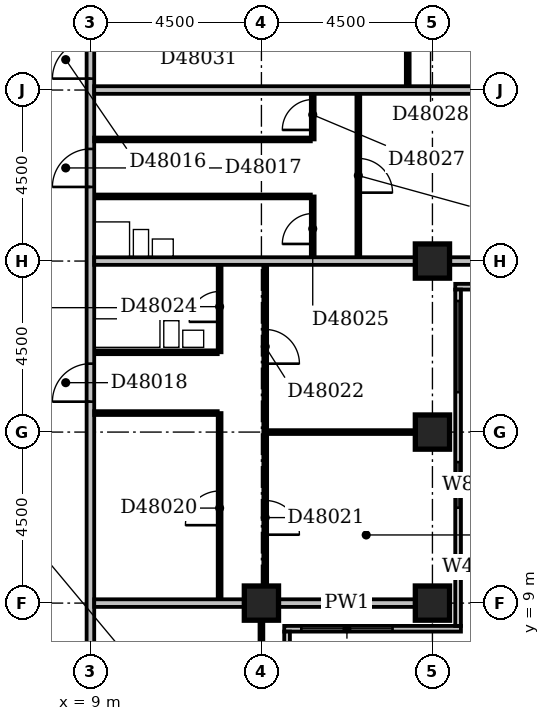
"""IFC4 building model, lengths in metres.
Left out: names, types, materials, properties, quantities, classifications, styles, units other than length and angle.
Written with IfcOpenShell. Run it as: python <this file> out.ifc"""

import sys

from ifc_helpers import new_model, si_unit, direction, frame, frame_2d, origin, origin_2d, place, context, subcontext, project, spatial, rectangle, extrude, element, fill, save


model = new_model("IFC4")
c1 = context("Model", 3, precision=1e-05, world=origin(), true_north=direction((0.0, 1.0)))
c2 = subcontext(c1, "Body", "Model", "MODEL_VIEW")
j1 = project(units=[si_unit("LENGTHUNIT", "METRE"), si_unit("PLANEANGLEUNIT", "RADIAN")], contexts=[c1])
p1 = place(None, origin())
s1 = spatial("IfcSite", under=j1, at=p1, CompositionType="ELEMENT")
p2 = place(p1, origin())
s2 = spatial("IfcBuilding", under=s1, at=p2, CompositionType="ELEMENT")
p3 = place(p2, frame((0.0, 0.0, 189.8)))
s3 = spatial("IfcBuildingStorey", under=s2, at=p3, CompositionType="ELEMENT", Elevation=189.8)
for number, where, z_axis, x_axis in (
    (1, (13.5, 9.0, -0.3), (0.0, 0.0, 1.0), (1.0, 0.0, 0.0)),
    (2, (18.0, 9.0, -0.3), (0.0, 0.0, 1.0), (1.0, 0.0, 0.0)),
    (3, (18.0, 13.5, -0.3), (0.0, 0.0, 1.0), (1.0, 0.0, 0.0)),
    (4, (18.0, 18.0, -0.3), (0.0, 0.0, 1.0), (1.0, 0.0, 0.0)),
):
    element("IfcColumn", number, at=place(p3, frame(where, z_axis=z_axis, x_axis=x_axis)), inside=s3, PredefinedType="COLUMN", context=c2, shape_type="SweptSolid", body=[
        extrude(rectangle(XDim=0.9, YDim=0.9, at=origin_2d()), origin(), (0.0, 0.0, 1.0), 3.6),
    ])
p4 = place(p3, frame((14.175, 3.9, 0.0), z_axis=(0.0, 0.0, 1.0), x_axis=(0.0, 1.0, 0.0)))
e5 = element("IfcWall", 5, at=p4, inside=s3, PredefinedType="STANDARD", context=c2, shape_type="SweptSolid", body=[
    extrude(rectangle(XDim=4.35, YDim=0.15, at=frame_2d((2.175, 0.0))), origin(), (0.0, 0.0, 1.0), 2.7),
])
p5 = place(p4, frame((1.65, 0.0, 0.6)))
e6 = element("IfcOpeningElement", 6, at=p5, cuts=e5, PredefinedType="OPENING", context=c2, shape_type="SweptSolid", body=[
    extrude(rectangle(XDim=2.4, YDim=1.8, at=frame_2d((1.2, 0.9))), frame((0.0, 0.087, 0.0), z_axis=(0.0, -1.0, 0.0), x_axis=(1.0, 0.0, 0.0)), (0.0, 0.0, 1.0), 0.174),
])
p6 = place(p3, frame((14.1, 8.325, 0.0), z_axis=(0.0, 0.0, 1.0), x_axis=(1.0, 0.0, 0.0)))
e7 = element("IfcWall", 7, at=p6, inside=s3, PredefinedType="STANDARD", context=c2, shape_type="SweptSolid", body=[
    extrude(rectangle(XDim=4.65, YDim=0.15, at=frame_2d((2.325, 0.0))), origin(), (0.0, 0.0, 1.0), 2.7),
])
p7 = place(p6, frame((0.45, 0.0, 0.6)))
e8 = element("IfcOpeningElement", 8, at=p7, cuts=e7, PredefinedType="OPENING", context=c2, shape_type="SweptSolid", body=[
    extrude(rectangle(XDim=2.4, YDim=1.8, at=frame_2d((1.2, 0.9))), frame((0.0, 0.087, 0.0), z_axis=(0.0, -1.0, 0.0), x_axis=(1.0, 0.0, 0.0)), (0.0, 0.0, 1.0), 0.174),
])
p8 = place(p3, frame((18.675, 8.4, 0.0), z_axis=(0.0, 0.0, 1.0), x_axis=(0.0, 1.0, 0.0)))
e9 = element("IfcWall", 9, at=p8, inside=s3, PredefinedType="STANDARD", context=c2, shape_type="SweptSolid", body=[
    extrude(rectangle(XDim=8.85, YDim=0.15, at=frame_2d((4.425, 0.0))), origin(), (0.0, 0.0, 1.0), 2.7),
])
p9 = place(p8, frame((1.259, 0.0, 0.6)))
e10 = element("IfcOpeningElement", 10, at=p9, cuts=e9, PredefinedType="OPENING", context=c2, shape_type="SweptSolid", body=[
    extrude(rectangle(XDim=0.6, YDim=1.8, at=frame_2d((0.3, 0.9))), frame((0.0, 0.087, 0.0), z_axis=(0.0, -1.0, 0.0), x_axis=(1.0, 0.0, 0.0)), (0.0, 0.0, 1.0), 0.174),
])
p10 = place(p8, frame((3.11, 0.0, 0.6)))
e11 = element("IfcOpeningElement", 11, at=p10, cuts=e9, PredefinedType="OPENING", context=c2, shape_type="SweptSolid", body=[
    extrude(rectangle(XDim=1.2, YDim=1.8, at=frame_2d((0.6, 0.9))), frame((0.0, 0.087, 0.0), z_axis=(0.0, -1.0, 0.0), x_axis=(1.0, 0.0, 0.0)), (0.0, 0.0, 1.0), 0.174),
])
p11 = place(p8, frame((6.15, 0.0, 0.6)))
e12 = element("IfcOpeningElement", 12, at=p11, cuts=e9, PredefinedType="OPENING", context=c2, shape_type="SweptSolid", body=[
    extrude(rectangle(XDim=2.4, YDim=1.8, at=frame_2d((1.2, 0.9))), frame((0.0, 0.087, 0.0), z_axis=(0.0, -1.0, 0.0), x_axis=(1.0, 0.0, 0.0)), (0.0, 0.0, 1.0), 0.174),
])
p12 = place(p3, frame((18.6, 17.325, 0.0), z_axis=(0.0, 0.0, 1.0), x_axis=(1.0, 0.0, 0.0)))
e13 = element("IfcWall", 13, at=p12, inside=s3, PredefinedType="STANDARD", context=c2, shape_type="SweptSolid", body=[
    extrude(rectangle(XDim=4.65, YDim=0.15, at=frame_2d((2.325, 0.0))), origin(), (0.0, 0.0, 1.0), 2.7),
])
p13 = place(p12, frame((0.45, 0.0, 0.6)))
e14 = element("IfcOpeningElement", 14, at=p13, cuts=e13, PredefinedType="OPENING", context=c2, shape_type="SweptSolid", body=[
    extrude(rectangle(XDim=2.4, YDim=1.8, at=frame_2d((1.2, 0.9))), frame((0.0, 0.087, 0.0), z_axis=(0.0, -1.0, 0.0), x_axis=(1.0, 0.0, 0.0)), (0.0, 0.0, 1.0), 0.174),
])
p14 = place(p3, frame((13.5, 4.95, 0.0), z_axis=(0.0, 0.0, 1.0), x_axis=(0.0, 1.0, 0.0)))
e15 = element("IfcWall", 15, at=p14, inside=s3, PredefinedType="PARTITIONING", context=c2, shape_type="SweptSolid", body=[
    extrude(rectangle(XDim=3.6, YDim=0.1, at=frame_2d((1.8, 0.0))), origin(), (0.0, 0.0, 1.0), 2.7),
])
p15 = place(p3, frame((9.0, 5.0, 0.0), z_axis=(0.0, 0.0, 1.0), x_axis=(0.0, 1.0, 0.0)))
e16 = element("IfcWall", 16, at=p15, inside=s3, PredefinedType="PARTITIONING", context=c2, shape_type="SweptSolid", body=[
    extrude(rectangle(XDim=31.0, YDim=0.2, at=frame_2d((15.5, 0.0))), origin(), (0.0, 0.0, 1.0), 3.3),
])
p16 = place(p15, frame((17.8, 0.0, 0.0)))
e17 = element("IfcOpeningElement", 17, at=p16, cuts=e16, PredefinedType="OPENING", context=c2, shape_type="SweptSolid", body=[
    extrude(rectangle(XDim=1.0, YDim=2.1, at=frame_2d((0.5, 1.05))), frame((0.0, 0.112, 0.0), z_axis=(0.0, -1.0, 0.0), x_axis=(1.0, 0.0, 0.0)), (0.0, 0.0, 1.0), 0.224),
])
p17 = place(p15, frame((14.95, 0.0, 0.0)))
e18 = element("IfcOpeningElement", 18, at=p17, cuts=e16, PredefinedType="OPENING", context=c2, shape_type="SweptSolid", body=[
    extrude(rectangle(XDim=1.0, YDim=2.1, at=frame_2d((0.5, 1.05))), frame((0.0, 0.112, 0.0), z_axis=(0.0, -1.0, 0.0), x_axis=(1.0, 0.0, 0.0)), (0.0, 0.0, 1.0), 0.224),
])
p18 = place(p15, frame((9.3, 0.0, 0.0)))
e19 = element("IfcOpeningElement", 19, at=p18, cuts=e16, PredefinedType="OPENING", context=c2, shape_type="SweptSolid", body=[
    extrude(rectangle(XDim=1.0, YDim=2.1, at=frame_2d((0.5, 1.05))), frame((0.0, 0.112, 0.0), z_axis=(0.0, -1.0, 0.0), x_axis=(1.0, 0.0, 0.0)), (0.0, 0.0, 1.0), 0.224),
])
p19 = place(p15, frame((1.5, 0.0, 0.0)))
e20 = element("IfcOpeningElement", 20, at=p19, cuts=e16, PredefinedType="OPENING", context=c2, shape_type="SweptSolid", body=[
    extrude(rectangle(XDim=0.9, YDim=2.1, at=frame_2d((0.45, 1.05))), frame((0.0, 0.112, 0.0), z_axis=(0.0, -1.0, 0.0), x_axis=(1.0, 0.0, 0.0)), (0.0, 0.0, 1.0), 0.224),
])
p20 = place(p3, frame((9.1, 9.0, 0.0), z_axis=(0.0, 0.0, 1.0), x_axis=(1.0, 0.0, 0.0)))
e21 = element("IfcWall", 21, at=p20, inside=s3, PredefinedType="PARTITIONING", context=c2, shape_type="SweptSolid", body=[
    extrude(rectangle(XDim=3.95, YDim=0.2, at=frame_2d((1.975, 0.0))), origin(), (0.0, 0.0, 1.0), 3.3),
])
p21 = place(p3, frame((13.95, 9.0, 0.0), z_axis=(0.0, 0.0, 1.0), x_axis=(1.0, 0.0, 0.0)))
e22 = element("IfcWall", 22, at=p21, inside=s3, PredefinedType="PARTITIONING", context=c2, shape_type="SweptSolid", body=[
    extrude(rectangle(XDim=3.6, YDim=0.2, at=frame_2d((1.8, 0.0))), origin(), (0.0, 0.0, 1.0), 2.7),
])
p22 = place(p3, frame((12.4, 9.1, 0.0), z_axis=(0.0, 0.0, 1.0), x_axis=(0.0, 1.0, 0.0)))
e23 = element("IfcWall", 23, at=p22, inside=s3, PredefinedType="PARTITIONING", context=c2, shape_type="SweptSolid", body=[
    extrude(rectangle(XDim=4.9, YDim=0.1, at=frame_2d((2.45, 0.0))), origin(), (0.0, 0.0, 1.0), 3.3),
])
p23 = place(p22, frame((1.95, 0.0, 0.0)))
e24 = element("IfcOpeningElement", 24, at=p23, cuts=e23, PredefinedType="OPENING", context=c2, shape_type="SweptSolid", body=[
    extrude(rectangle(XDim=0.9, YDim=2.1, at=frame_2d((0.45, 1.05))), frame((0.0, 0.062, 0.0), z_axis=(0.0, -1.0, 0.0), x_axis=(1.0, 0.0, 0.0)), (0.0, 0.0, 1.0), 0.124),
])
p24 = place(p3, frame((13.6, 9.45, 0.0), z_axis=(0.0, 0.0, 1.0), x_axis=(0.0, 1.0, 0.0)))
e25 = element("IfcWall", 25, at=p24, inside=s3, PredefinedType="PARTITIONING", context=c2, shape_type="SweptSolid", body=[
    extrude(rectangle(XDim=8.45, YDim=0.1, at=frame_2d((4.225, 0.0))), origin(), (0.0, 0.0, 1.0), 3.3),
])
p25 = place(p24, frame((1.35, 0.0, 0.0)))
e26 = element("IfcOpeningElement", 26, at=p25, cuts=e25, PredefinedType="OPENING", context=c2, shape_type="SweptSolid", body=[
    extrude(rectangle(XDim=0.9, YDim=2.1, at=frame_2d((0.45, 1.05))), frame((0.0, 0.062, 0.0), z_axis=(0.0, -1.0, 0.0), x_axis=(1.0, 0.0, 0.0)), (0.0, 0.0, 1.0), 0.124),
])
p26 = place(p24, frame((5.85, 0.0, 0.0)))
e27 = element("IfcOpeningElement", 27, at=p26, cuts=e25, PredefinedType="OPENING", context=c2, shape_type="SweptSolid", body=[
    extrude(rectangle(XDim=0.9, YDim=2.1, at=frame_2d((0.45, 1.05))), frame((0.0, 0.062, 0.0), z_axis=(0.0, -1.0, 0.0), x_axis=(1.0, 0.0, 0.0)), (0.0, 0.0, 1.0), 0.124),
])
p27 = place(p3, frame((13.65, 13.5, 0.0), z_axis=(0.0, 0.0, 1.0), x_axis=(1.0, 0.0, 0.0)))
e28 = element("IfcWall", 28, at=p27, inside=s3, PredefinedType="PARTITIONING", context=c2, shape_type="SweptSolid", body=[
    extrude(rectangle(XDim=3.9, YDim=0.1, at=frame_2d((1.95, 0.0))), origin(), (0.0, 0.0, 1.0), 3.3),
])
p28 = place(p3, frame((9.1, 14.0, 0.0), z_axis=(0.0, 0.0, 1.0), x_axis=(1.0, 0.0, 0.0)))
e29 = element("IfcWall", 29, at=p28, inside=s3, PredefinedType="PARTITIONING", context=c2, shape_type="SweptSolid", body=[
    extrude(rectangle(XDim=3.25, YDim=0.1, at=frame_2d((1.625, 0.0))), origin(), (0.0, 0.0, 1.0), 3.3),
])
p29 = place(p3, frame((9.1, 15.6, 0.0), z_axis=(0.0, 0.0, 1.0), x_axis=(1.0, 0.0, 0.0)))
e30 = element("IfcWall", 30, at=p29, inside=s3, PredefinedType="PLUMBINGWALL", context=c2, shape_type="SweptSolid", body=[
    extrude(rectangle(XDim=3.25, YDim=0.1, at=frame_2d((1.625, 0.0))), origin(), (0.0, 0.0, 1.0), 3.3),
])
p30 = place(p3, frame((12.4, 15.6, 0.0), z_axis=(0.0, 0.0, 1.0), x_axis=(0.0, 1.0, 0.0)))
e31 = element("IfcWall", 31, at=p30, inside=s3, PredefinedType="PARTITIONING", context=c2, shape_type="SweptSolid", body=[
    extrude(rectangle(XDim=2.3, YDim=0.1, at=frame_2d((1.15, 0.0))), origin(), (0.0, 0.0, 1.0), 3.3),
])
p31 = place(p30, frame((0.8, 0.0, 0.0)))
e32 = element("IfcOpeningElement", 32, at=p31, cuts=e31, PredefinedType="OPENING", context=c2, shape_type="SweptSolid", body=[
    extrude(rectangle(XDim=0.8, YDim=2.1, at=frame_2d((0.4, 1.05))), frame((0.0, 0.062, 0.0), z_axis=(0.0, -1.0, 0.0), x_axis=(1.0, 0.0, 0.0)), (0.0, 0.0, 1.0), 0.124),
])
p32 = place(p3, frame((9.1, 18.0, 0.0), z_axis=(0.0, 0.0, 1.0), x_axis=(1.0, 0.0, 0.0)))
e33 = element("IfcWall", 33, at=p32, inside=s3, PredefinedType="PARTITIONING", context=c2, shape_type="SweptSolid", body=[
    extrude(rectangle(XDim=8.45, YDim=0.2, at=frame_2d((4.225, 0.0))), origin(), (0.0, 0.0, 1.0), 2.6),
])
p33 = place(p3, frame((18.45, 18.0, 0.0), z_axis=(0.0, 0.0, 1.0), x_axis=(1.0, 0.0, 0.0)))
e34 = element("IfcWall", 34, at=p33, inside=s3, PredefinedType="PARTITIONING", context=c2, shape_type="SweptSolid", body=[
    extrude(rectangle(XDim=3.6, YDim=0.2, at=frame_2d((1.8, 0.0))), origin(), (0.0, 0.0, 1.0), 2.7),
])
p34 = place(p3, frame((14.85, 18.1, 0.0), z_axis=(0.0, 0.0, 1.0), x_axis=(0.0, 1.0, 0.0)))
e35 = element("IfcWall", 35, at=p34, inside=s3, PredefinedType="PARTITIONING", context=c2, shape_type="SweptSolid", body=[
    extrude(rectangle(XDim=1.6, YDim=0.1, at=frame_2d((0.8, 0.0))), origin(), (0.0, 0.0, 1.0), 3.3),
])
p35 = place(p34, frame((0.35, 0.0, 0.0)))
e36 = element("IfcOpeningElement", 36, at=p35, cuts=e35, PredefinedType="OPENING", context=c2, shape_type="SweptSolid", body=[
    extrude(rectangle(XDim=0.8, YDim=2.1, at=frame_2d((0.4, 1.05))), frame((0.0, 0.062, 0.0), z_axis=(0.0, -1.0, 0.0), x_axis=(1.0, 0.0, 0.0)), (0.0, 0.0, 1.0), 0.124),
])
p36 = place(p3, frame((16.05, 18.1, 0.0), z_axis=(0.0, 0.0, 1.0), x_axis=(0.0, 1.0, 0.0)))
e37 = element("IfcWall", 37, at=p36, inside=s3, PredefinedType="PARTITIONING", context=c2, shape_type="SweptSolid", body=[
    extrude(rectangle(XDim=4.3, YDim=0.1, at=frame_2d((2.15, 0.0))), origin(), (0.0, 0.0, 1.0), 3.3),
])
p37 = place(p36, frame((1.7, 0.0, 0.0)))
e38 = element("IfcOpeningElement", 38, at=p37, cuts=e37, PredefinedType="OPENING", context=c2, shape_type="SweptSolid", body=[
    extrude(rectangle(XDim=0.9, YDim=2.1, at=frame_2d((0.45, 1.05))), frame((0.0, 0.062, 0.0), z_axis=(0.0, -1.0, 0.0), x_axis=(1.0, 0.0, 0.0)), (0.0, 0.0, 1.0), 0.124),
])
p38 = place(p3, frame((9.1, 19.7, 0.0), z_axis=(0.0, 0.0, 1.0), x_axis=(1.0, 0.0, 0.0)))
e39 = element("IfcWall", 39, at=p38, inside=s3, PredefinedType="PLUMBINGWALL", context=c2, shape_type="SweptSolid", body=[
    extrude(rectangle(XDim=5.7, YDim=0.1, at=frame_2d((2.85, 0.0))), origin(), (0.0, 0.0, 1.0), 3.3),
])
p39 = place(p3, frame((9.1, 21.2, 0.0), z_axis=(0.0, 0.0, 1.0), x_axis=(1.0, 0.0, 0.0)))
e40 = element("IfcWall", 40, at=p39, inside=s3, PredefinedType="PARTITIONING", context=c2, shape_type="SweptSolid", body=[
    extrude(rectangle(XDim=5.7, YDim=0.1, at=frame_2d((2.85, 0.0))), origin(), (0.0, 0.0, 1.0), 3.3),
])
p40 = place(p3, frame((14.85, 21.2, 0.0), z_axis=(0.0, 0.0, 1.0), x_axis=(0.0, 1.0, 0.0)))
e41 = element("IfcWall", 41, at=p40, inside=s3, PredefinedType="PARTITIONING", context=c2, shape_type="SweptSolid", body=[
    extrude(rectangle(XDim=1.2, YDim=0.1, at=frame_2d((0.6, 0.0))), origin(), (0.0, 0.0, 1.0), 3.3),
])
p41 = place(p40, frame((0.25, 0.0, 0.0)))
e42 = element("IfcOpeningElement", 42, at=p41, cuts=e41, PredefinedType="OPENING", context=c2, shape_type="SweptSolid", body=[
    extrude(rectangle(XDim=0.8, YDim=2.1, at=frame_2d((0.4, 1.05))), frame((0.0, 0.062, 0.0), z_axis=(0.0, -1.0, 0.0), x_axis=(1.0, 0.0, 0.0)), (0.0, 0.0, 1.0), 0.124),
])
p42 = place(p3, frame((9.1, 22.5, 0.0), z_axis=(0.0, 0.0, 1.0), x_axis=(1.0, 0.0, 0.0)))
e43 = element("IfcWall", 43, at=p42, inside=s3, PredefinedType="PARTITIONING", context=c2, shape_type="SweptSolid", body=[
    extrude(rectangle(XDim=12.95, YDim=0.2, at=frame_2d((6.475, 0.0))), origin(), (0.0, 0.0, 1.0), 3.3),
])
p43 = place(p3, frame((17.35, 22.6, 0.0), z_axis=(0.0, 0.0, 1.0), x_axis=(0.0, 1.0, 0.0)))
e44 = element("IfcWall", 44, at=p43, inside=s3, PredefinedType="PARTITIONING", context=c2, shape_type="SweptSolid", body=[
    extrude(rectangle(XDim=13.3, YDim=0.1, at=frame_2d((6.65, 0.0))), origin(), (0.0, 0.0, 1.0), 3.3),
])
p44 = place(p43, frame((1.7, 0.0, 0.0)))
e45 = element("IfcOpeningElement", 45, at=p44, cuts=e44, PredefinedType="OPENING", context=c2, shape_type="SweptSolid", body=[
    extrude(rectangle(XDim=0.9, YDim=2.1, at=frame_2d((0.45, 1.05))), frame((0.0, 0.062, 0.0), z_axis=(0.0, -1.0, 0.0), x_axis=(1.0, 0.0, 0.0)), (0.0, 0.0, 1.0), 0.124),
])
p45 = place(p43, frame((7.35, 0.0, 0.0)))
e46 = element("IfcOpeningElement", 46, at=p45, cuts=e44, PredefinedType="OPENING", context=c2, shape_type="SweptSolid", body=[
    extrude(rectangle(XDim=0.9, YDim=2.1, at=frame_2d((0.45, 1.05))), frame((0.0, 0.062, 0.0), z_axis=(0.0, -1.0, 0.0), x_axis=(1.0, 0.0, 0.0)), (0.0, 0.0, 1.0), 0.124),
])
p46 = place(p43, frame((10.7, 0.0, 0.0)))
e47 = element("IfcOpeningElement", 47, at=p46, cuts=e44, PredefinedType="OPENING", context=c2, shape_type="SweptSolid", body=[
    extrude(rectangle(XDim=0.9, YDim=2.1, at=frame_2d((0.45, 1.05))), frame((0.0, 0.062, 0.0), z_axis=(0.0, -1.0, 0.0), x_axis=(1.0, 0.0, 0.0)), (0.0, 0.0, 1.0), 0.124),
])
p47 = place(p7, origin())
e48 = element("IfcWindow", 48, at=p47, inside=s3, PartitioningType="SINGLE_PANEL", PredefinedType="WINDOW", context=c2, shape_type="SweptSolid", body=[
    extrude(rectangle(XDim=2.4, YDim=1.8, at=frame_2d((1.2, 0.9))), frame((0.0, 0.03, 0.0), z_axis=(0.0, -1.0, 0.0), x_axis=(1.0, 0.0, 0.0)), (0.0, 0.0, 1.0), 0.06),
])
fill(e8, e48)
p48 = place(p9, origin())
e49 = element("IfcWindow", 49, at=p48, inside=s3, PartitioningType="SINGLE_PANEL", PredefinedType="WINDOW", context=c2, shape_type="SweptSolid", body=[
    extrude(rectangle(XDim=0.6, YDim=1.8, at=frame_2d((0.3, 0.9))), frame((0.0, 0.03, 0.0), z_axis=(0.0, -1.0, 0.0), x_axis=(1.0, 0.0, 0.0)), (0.0, 0.0, 1.0), 0.06),
])
fill(e10, e49)
p49 = place(p10, origin())
e50 = element("IfcWindow", 50, at=p49, inside=s3, PartitioningType="SINGLE_PANEL", PredefinedType="WINDOW", context=c2, shape_type="SweptSolid", body=[
    extrude(rectangle(XDim=1.2, YDim=1.8, at=frame_2d((0.6, 0.9))), frame((0.0, 0.03, 0.0), z_axis=(0.0, -1.0, 0.0), x_axis=(1.0, 0.0, 0.0)), (0.0, 0.0, 1.0), 0.06),
])
fill(e11, e50)
p50 = place(p11, origin())
e51 = element("IfcWindow", 51, at=p50, inside=s3, PartitioningType="SINGLE_PANEL", PredefinedType="WINDOW", context=c2, shape_type="SweptSolid", body=[
    extrude(rectangle(XDim=2.4, YDim=1.8, at=frame_2d((1.2, 0.9))), frame((0.0, 0.03, 0.0), z_axis=(0.0, -1.0, 0.0), x_axis=(1.0, 0.0, 0.0)), (0.0, 0.0, 1.0), 0.06),
])
fill(e12, e51)
p51 = place(p16, origin())
e52 = element("IfcDoor", 52, at=p51, inside=s3, OperationType="SINGLE_SWING_LEFT", PredefinedType="DOOR", context=c2, shape_type="SweptSolid", body=[
    extrude(rectangle(XDim=1.0, YDim=2.1, at=frame_2d((0.5, 1.05))), frame((0.0, 0.025, 0.0), z_axis=(0.0, -1.0, 0.0), x_axis=(1.0, 0.0, 0.0)), (0.0, 0.0, 1.0), 0.05),
])
fill(e17, e52)
p52 = place(p17, origin())
e53 = element("IfcDoor", 53, at=p52, inside=s3, OperationType="SINGLE_SWING_LEFT", PredefinedType="DOOR", context=c2, shape_type="SweptSolid", body=[
    extrude(rectangle(XDim=1.0, YDim=2.1, at=frame_2d((0.5, 1.05))), frame((0.0, 0.025, 0.0), z_axis=(0.0, -1.0, 0.0), x_axis=(1.0, 0.0, 0.0)), (0.0, 0.0, 1.0), 0.05),
])
fill(e18, e53)
p53 = place(p18, origin())
e54 = element("IfcDoor", 54, at=p53, inside=s3, OperationType="SINGLE_SWING_LEFT", PredefinedType="DOOR", context=c2, shape_type="SweptSolid", body=[
    extrude(rectangle(XDim=1.0, YDim=2.1, at=frame_2d((0.5, 1.05))), frame((0.0, 0.025, 0.0), z_axis=(0.0, -1.0, 0.0), x_axis=(1.0, 0.0, 0.0)), (0.0, 0.0, 1.0), 0.05),
])
fill(e19, e54)
p54 = place(p23, origin())
e55 = element("IfcDoor", 55, at=p54, inside=s3, OperationType="SINGLE_SWING_LEFT", PredefinedType="DOOR", context=c2, shape_type="SweptSolid", body=[
    extrude(rectangle(XDim=0.9, YDim=2.1, at=frame_2d((0.45, 1.05))), frame((0.0, 0.025, 0.0), z_axis=(0.0, -1.0, 0.0), x_axis=(1.0, 0.0, 0.0)), (0.0, 0.0, 1.0), 0.05),
])
fill(e24, e55)
p55 = place(p25, frame((0.9, 0.0, 0.0), z_axis=(0.0, 0.0, 1.0), x_axis=(-1.0, 0.0, 0.0)))
e56 = element("IfcDoor", 56, at=p55, inside=s3, OperationType="SINGLE_SWING_RIGHT", PredefinedType="DOOR", context=c2, shape_type="SweptSolid", body=[
    extrude(rectangle(XDim=0.9, YDim=2.1, at=frame_2d((0.45, 1.05))), frame((0.0, 0.025, 0.0), z_axis=(0.0, -1.0, 0.0), x_axis=(1.0, 0.0, 0.0)), (0.0, 0.0, 1.0), 0.05),
])
fill(e26, e56)
p56 = place(p26, frame((0.9, 0.0, 0.0), z_axis=(0.0, 0.0, 1.0), x_axis=(-1.0, 0.0, 0.0)))
e57 = element("IfcDoor", 57, at=p56, inside=s3, OperationType="SINGLE_SWING_RIGHT", PredefinedType="DOOR", context=c2, shape_type="SweptSolid", body=[
    extrude(rectangle(XDim=0.9, YDim=2.1, at=frame_2d((0.45, 1.05))), frame((0.0, 0.025, 0.0), z_axis=(0.0, -1.0, 0.0), x_axis=(1.0, 0.0, 0.0)), (0.0, 0.0, 1.0), 0.05),
])
fill(e27, e57)
p57 = place(p31, origin())
e58 = element("IfcDoor", 58, at=p57, inside=s3, OperationType="SINGLE_SWING_LEFT", PredefinedType="DOOR", context=c2, shape_type="SweptSolid", body=[
    extrude(rectangle(XDim=0.8, YDim=2.1, at=frame_2d((0.4, 1.05))), frame((0.0, 0.025, 0.0), z_axis=(0.0, -1.0, 0.0), x_axis=(1.0, 0.0, 0.0)), (0.0, 0.0, 1.0), 0.05),
])
fill(e32, e58)
p58 = place(p35, origin())
e59 = element("IfcDoor", 59, at=p58, inside=s3, OperationType="SINGLE_SWING_LEFT", PredefinedType="DOOR", context=c2, shape_type="SweptSolid", body=[
    extrude(rectangle(XDim=0.8, YDim=2.1, at=frame_2d((0.4, 1.05))), frame((0.0, 0.025, 0.0), z_axis=(0.0, -1.0, 0.0), x_axis=(1.0, 0.0, 0.0)), (0.0, 0.0, 1.0), 0.05),
])
fill(e36, e59)
p59 = place(p37, frame((0.9, 0.0, 0.0), z_axis=(0.0, 0.0, 1.0), x_axis=(-1.0, 0.0, 0.0)))
e60 = element("IfcDoor", 60, at=p59, inside=s3, OperationType="SINGLE_SWING_RIGHT", PredefinedType="DOOR", context=c2, shape_type="SweptSolid", body=[
    extrude(rectangle(XDim=0.9, YDim=2.1, at=frame_2d((0.45, 1.05))), frame((0.0, 0.025, 0.0), z_axis=(0.0, -1.0, 0.0), x_axis=(1.0, 0.0, 0.0)), (0.0, 0.0, 1.0), 0.05),
])
fill(e38, e60)
p60 = place(p41, origin())
e61 = element("IfcDoor", 61, at=p60, inside=s3, OperationType="SINGLE_SWING_LEFT", PredefinedType="DOOR", context=c2, shape_type="SweptSolid", body=[
    extrude(rectangle(XDim=0.8, YDim=2.1, at=frame_2d((0.4, 1.05))), frame((0.0, 0.025, 0.0), z_axis=(0.0, -1.0, 0.0), x_axis=(1.0, 0.0, 0.0)), (0.0, 0.0, 1.0), 0.05),
])
fill(e42, e61)
save(model, sys.argv[1])
